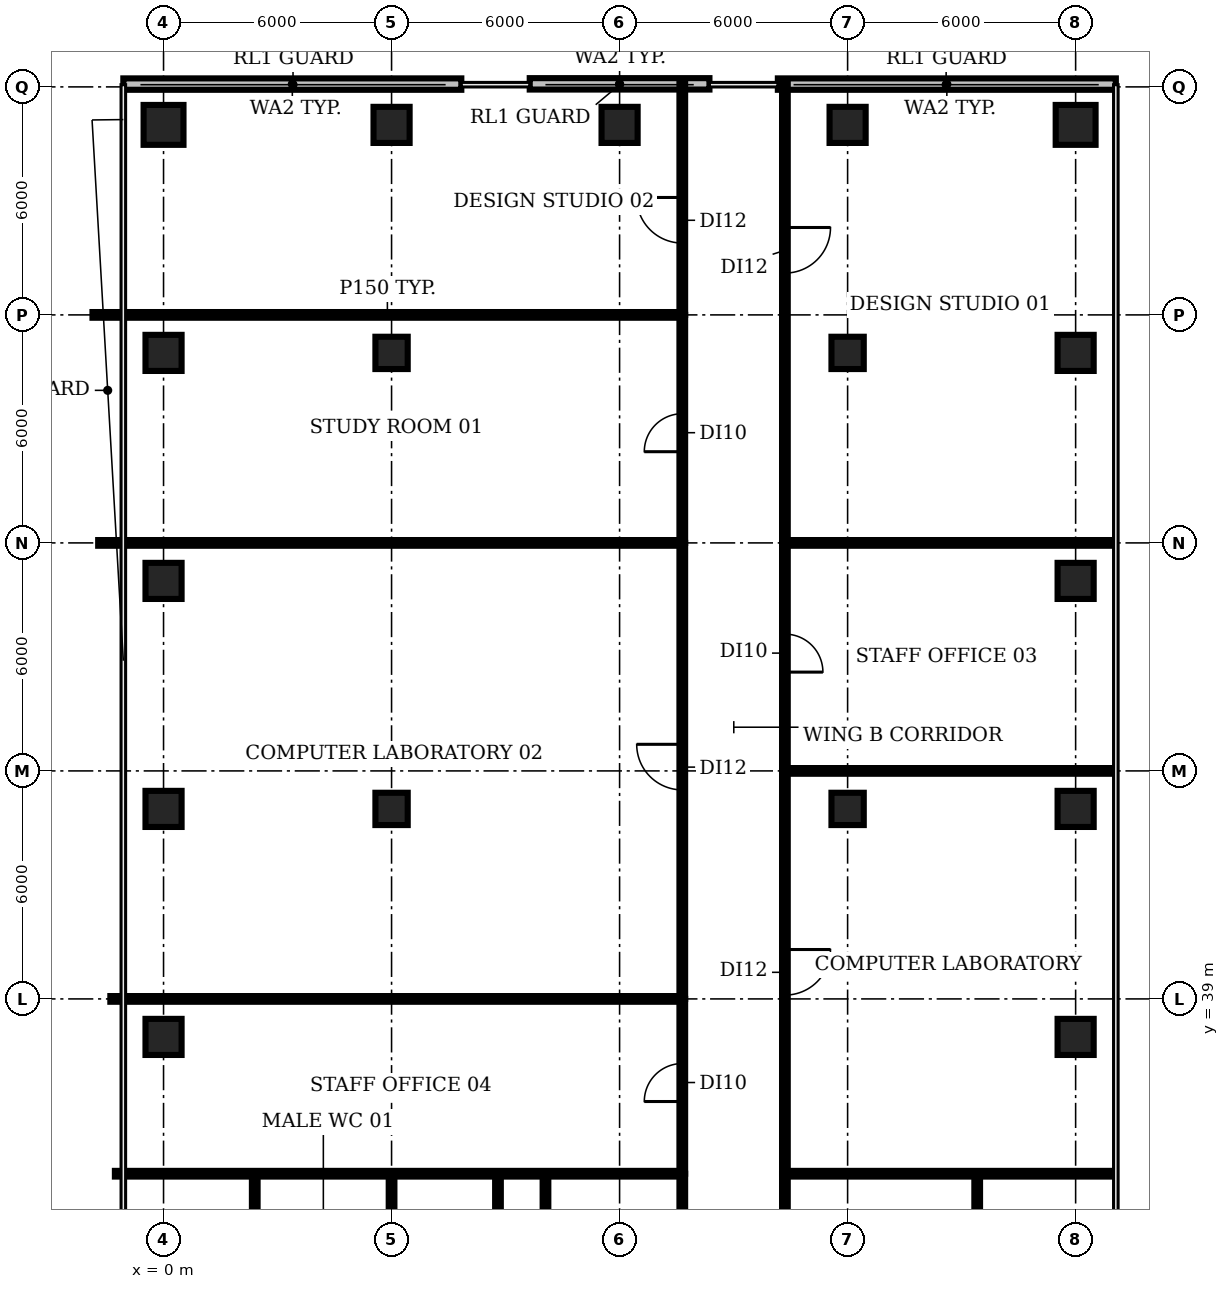
"""IFC4 building model, lengths in metres.
Left out: names, types, materials, properties, quantities, classifications, styles, units other than length and angle.
Written with IfcOpenShell. Run it as: python <this file> out.ifc"""

import sys

from ifc_helpers import new_model, si_unit, direction, frame, frame_2d, origin, origin_2d, place, context, subcontext, project, spatial, rectangle, circle, extrude, element, fill, save


model = new_model("IFC4")
c1 = context("Model", 3, precision=1e-05, world=origin(), true_north=direction((0.0, 1.0)))
c2 = subcontext(c1, "Body", "Model", "MODEL_VIEW")
j1 = project(units=[si_unit("LENGTHUNIT", "METRE"), si_unit("PLANEANGLEUNIT", "RADIAN")], contexts=[c1])
p1 = place(None, origin())
s1 = spatial("IfcSite", under=j1, at=p1, CompositionType="ELEMENT")
p2 = place(p1, origin())
s2 = spatial("IfcBuilding", under=s1, at=p2, CompositionType="ELEMENT")
p3 = place(p2, frame((0.0, 0.0, 58.4)))
s3 = spatial("IfcBuildingStorey", under=s2, at=p3, CompositionType="ELEMENT", Elevation=58.4)
for number, where, z_axis, x_axis in (
    (1, (0.0, 38.0, 0.0), (0.0, 0.0, 1.0), (1.0, 0.0, 0.0)),
    (2, (0.0, 44.0, 0.0), (0.0, 0.0, 1.0), (1.0, 0.0, 0.0)),
    (3, (0.0, 50.0, 0.0), (0.0, 0.0, 1.0), (1.0, 0.0, 0.0)),
    (4, (0.0, 56.0, 0.0), (0.0, 0.0, 1.0), (1.0, 0.0, 0.0)),
):
    element("IfcColumn", number, at=place(p3, frame(where, z_axis=z_axis, x_axis=x_axis)), inside=s3, PredefinedType="COLUMN", context=c2, shape_type="SweptSolid", body=[
        extrude(rectangle(XDim=0.95, YDim=0.95, at=origin_2d()), origin(), (0.0, 0.0, 1.0), 3.85),
    ])
p4 = place(p3, frame((0.0, 62.0, 0.0), z_axis=(0.0, 0.0, 1.0), x_axis=(1.0, 0.0, 0.0)))
e5 = element("IfcColumn", 5, at=p4, inside=s3, PredefinedType="COLUMN", context=c2, shape_type="SweptSolid", body=[
    extrude(circle(Radius=0.525, at=origin_2d()), origin(), (0.0, 0.0, 1.0), 3.85),
])
for number, where, z_axis, x_axis in (
    (6, (6.0, 44.0, 0.0), (0.0, 0.0, 1.0), (1.0, 0.0, 0.0)),
    (7, (6.0, 56.0, 0.0), (0.0, 0.0, 1.0), (1.0, 0.0, 0.0)),
):
    element("IfcColumn", number, at=place(p3, frame(where, z_axis=z_axis, x_axis=x_axis)), inside=s3, PredefinedType="COLUMN", context=c2, shape_type="SweptSolid", body=[
        extrude(rectangle(XDim=0.85, YDim=0.85, at=origin_2d()), origin(), (0.0, 0.0, 1.0), 3.85),
    ])
for number, where, z_axis, x_axis in (
    (8, (6.0, 62.0, 0.0), (0.0, 0.0, 1.0), (1.0, 0.0, 0.0)),
    (9, (12.0, 62.0, 0.0), (0.0, 0.0, 1.0), (1.0, 0.0, 0.0)),
):
    element("IfcColumn", number, at=place(p3, frame(where, z_axis=z_axis, x_axis=x_axis)), inside=s3, PredefinedType="COLUMN", context=c2, shape_type="SweptSolid", body=[
        extrude(rectangle(XDim=0.95, YDim=0.95, at=origin_2d()), origin(), (0.0, 0.0, 1.0), 3.85),
    ])
for number, where, z_axis, x_axis in (
    (10, (18.0, 44.0, 0.0), (0.0, 0.0, 1.0), (1.0, 0.0, 0.0)),
    (11, (18.0, 56.0, 0.0), (0.0, 0.0, 1.0), (1.0, 0.0, 0.0)),
):
    element("IfcColumn", number, at=place(p3, frame(where, z_axis=z_axis, x_axis=x_axis)), inside=s3, PredefinedType="COLUMN", context=c2, shape_type="SweptSolid", body=[
        extrude(rectangle(XDim=0.85, YDim=0.85, at=origin_2d()), origin(), (0.0, 0.0, 1.0), 3.85),
    ])
for number, where, z_axis, x_axis in (
    (12, (18.0, 62.0, 0.0), (0.0, 0.0, 1.0), (1.0, 0.0, 0.0)),
    (13, (24.0, 38.0, 0.0), (0.0, 0.0, 1.0), (1.0, 0.0, 0.0)),
    (14, (24.0, 44.0, 0.0), (0.0, 0.0, 1.0), (1.0, 0.0, 0.0)),
    (15, (24.0, 50.0, 0.0), (0.0, 0.0, 1.0), (1.0, 0.0, 0.0)),
    (16, (24.0, 56.0, 0.0), (0.0, 0.0, 1.0), (1.0, 0.0, 0.0)),
):
    element("IfcColumn", number, at=place(p3, frame(where, z_axis=z_axis, x_axis=x_axis)), inside=s3, PredefinedType="COLUMN", context=c2, shape_type="SweptSolid", body=[
        extrude(rectangle(XDim=0.95, YDim=0.95, at=origin_2d()), origin(), (0.0, 0.0, 1.0), 3.85),
    ])
p5 = place(p3, frame((24.0, 62.0, 0.0), z_axis=(0.0, 0.0, 1.0), x_axis=(1.0, 0.0, 0.0)))
e17 = element("IfcColumn", 17, at=p5, inside=s3, PredefinedType="COLUMN", context=c2, shape_type="SweptSolid", body=[
    extrude(circle(Radius=0.525, at=origin_2d()), origin(), (0.0, 0.0, 1.0), 3.85),
])
p6 = place(p3, frame((25.058, 63.074, 0.0), z_axis=(0.0, 0.0, 1.0), x_axis=(-1.0, 0.0, 0.0)))
e18 = element("IfcWall", 18, at=p6, inside=s3, PredefinedType="SOLIDWALL", context=c2, shape_type="SweptSolid", body=[
    extrude(rectangle(XDim=8.894, YDim=0.3, at=frame_2d((4.447, 0.0))), origin(), (0.0, 0.0, 1.0), 3.85),
])
p7 = place(p3, frame((14.365, 63.08, 0.0), z_axis=(0.0, 0.0, 1.0), x_axis=(-1.0, 0.0, 0.0)))
e19 = element("IfcWall", 19, at=p7, inside=s3, PredefinedType="SOLIDWALL", context=c2, shape_type="SweptSolid", body=[
    extrude(rectangle(XDim=4.729, YDim=0.3, at=frame_2d((2.365, 0.0))), origin(), (0.0, 0.0, 1.0), 3.85),
])
p8 = place(p3, frame((7.835, 63.074, 0.0), z_axis=(0.0, 0.0, 1.0), x_axis=(-1.0, 0.0, 0.0)))
e20 = element("IfcWall", 20, at=p8, inside=s3, PredefinedType="SOLIDWALL", context=c2, shape_type="SweptSolid", body=[
    extrude(rectangle(XDim=8.894, YDim=0.3, at=frame_2d((4.447, 0.0))), origin(), (0.0, 0.0, 1.0), 3.85),
])
p9 = place(p3, frame((-1.87, 57.0, 0.0), z_axis=(0.0, 0.0, 1.0), x_axis=(1.0, 0.0, 0.0)))
e21 = element("IfcWall", 21, at=p9, inside=s3, PredefinedType="PARTITIONING", context=c2, shape_type="SweptSolid", body=[
    extrude(rectangle(XDim=15.52, YDim=0.15, at=frame_2d((7.76, 0.0))), origin(), (0.0, 0.0, 1.0), 2.83),
])
p10 = place(p3, frame((-1.72, 51.0, 0.0), z_axis=(0.0, 0.0, 1.0), x_axis=(1.0, 0.0, 0.0)))
e22 = element("IfcWall", 22, at=p10, inside=s3, PredefinedType="PARTITIONING", context=c2, shape_type="SweptSolid", body=[
    extrude(rectangle(XDim=15.37, YDim=0.15, at=frame_2d((7.685, 0.0))), origin(), (0.0, 0.0, 1.0), 2.83),
])
p11 = place(p3, frame((-1.4, 39.0, 0.0), z_axis=(0.0, 0.0, 1.0), x_axis=(1.0, 0.0, 0.0)))
e23 = element("IfcWall", 23, at=p11, inside=s3, PredefinedType="PARTITIONING", context=c2, shape_type="SweptSolid", body=[
    extrude(rectangle(XDim=15.05, YDim=0.15, at=frame_2d((7.525, 0.0))), origin(), (0.0, 0.0, 1.0), 2.83),
])
p12 = place(p3, frame((-1.28, 34.4, 0.0), z_axis=(0.0, 0.0, 1.0), x_axis=(1.0, 0.0, 0.0)))
e24 = element("IfcWall", 24, at=p12, inside=s3, PredefinedType="PARTITIONING", context=c2, shape_type="SweptSolid", body=[
    extrude(rectangle(XDim=14.93, YDim=0.15, at=frame_2d((7.465, 0.0))), origin(), (0.0, 0.0, 1.0), 2.83),
])
for number, where, z_axis, x_axis in (
    (25, (2.4, 29.6, 0.0), (0.0, 0.0, 1.0), (0.0, 1.0, 0.0)),
    (26, (6.0, 29.6, 0.0), (0.0, 0.0, 1.0), (0.0, 1.0, 0.0)),
    (27, (8.8, 29.6, 0.0), (0.0, 0.0, 1.0), (0.0, 1.0, 0.0)),
    (28, (10.05, 29.6, 0.0), (0.0, 0.0, 1.0), (0.0, 1.0, 0.0)),
):
    element("IfcWall", number, at=place(p3, frame(where, z_axis=z_axis, x_axis=x_axis)), inside=s3, PredefinedType="PARTITIONING", context=c2, shape_type="SweptSolid", body=[
        extrude(rectangle(XDim=4.8, YDim=0.15, at=frame_2d((2.4, 0.0))), origin(), (0.0, 0.0, 1.0), 2.83),
    ])
p13 = place(p3, frame((13.65, 29.6, 0.0), z_axis=(0.0, 0.0, 1.0), x_axis=(0.0, 1.0, 0.0)))
e29 = element("IfcWall", 29, at=p13, inside=s3, PredefinedType="PARTITIONING", context=c2, shape_type="SweptSolid", body=[
    extrude(rectangle(XDim=4.8, YDim=0.15, at=frame_2d((2.4, 0.0))), origin(), (0.0, 0.0, 1.0), 2.83),
])
p14 = place(p13, frame((1.9, 0.0, 0.0)))
e30 = element("IfcOpeningElement", 30, at=p14, cuts=e29, PredefinedType="OPENING", context=c2, shape_type="SweptSolid", body=[
    extrude(rectangle(XDim=0.9, YDim=2.1, at=frame_2d((0.45, 1.05))), frame((0.0, 0.085, 0.0), z_axis=(0.0, -1.0, 0.0), x_axis=(1.0, 0.0, 0.0)), (0.0, 0.0, 1.0), 0.17),
])
p15 = place(p3, frame((13.65, 34.4, 0.0), z_axis=(0.0, 0.0, 1.0), x_axis=(0.0, 1.0, 0.0)))
e31 = element("IfcWall", 31, at=p15, inside=s3, PredefinedType="PARTITIONING", context=c2, shape_type="SweptSolid", body=[
    extrude(rectangle(XDim=4.6, YDim=0.15, at=frame_2d((2.3, 0.0))), origin(), (0.0, 0.0, 1.0), 2.83),
])
p16 = place(p15, frame((1.9, 0.0, 0.0)))
e32 = element("IfcOpeningElement", 32, at=p16, cuts=e31, PredefinedType="OPENING", context=c2, shape_type="SweptSolid", body=[
    extrude(rectangle(XDim=1.0, YDim=2.1, at=frame_2d((0.5, 1.05))), frame((0.0, 0.085, 0.0), z_axis=(0.0, -1.0, 0.0), x_axis=(1.0, 0.0, 0.0)), (0.0, 0.0, 1.0), 0.17),
])
p17 = place(p3, frame((13.65, 39.0, 0.0), z_axis=(0.0, 0.0, 1.0), x_axis=(0.0, 1.0, 0.0)))
e33 = element("IfcWall", 33, at=p17, inside=s3, PredefinedType="PARTITIONING", context=c2, shape_type="SweptSolid", body=[
    extrude(rectangle(XDim=12.0, YDim=0.15, at=frame_2d((6.0, 0.0))), origin(), (0.0, 0.0, 1.0), 2.83),
])
p18 = place(p17, frame((5.5, 0.0, 0.0)))
e34 = element("IfcOpeningElement", 34, at=p18, cuts=e33, PredefinedType="OPENING", context=c2, shape_type="SweptSolid", body=[
    extrude(rectangle(XDim=1.2, YDim=2.1, at=frame_2d((0.6, 1.05))), frame((0.0, 0.085, 0.0), z_axis=(0.0, -1.0, 0.0), x_axis=(1.0, 0.0, 0.0)), (0.0, 0.0, 1.0), 0.17),
])
p19 = place(p3, frame((13.65, 51.0, 0.0), z_axis=(0.0, 0.0, 1.0), x_axis=(0.0, 1.0, 0.0)))
e35 = element("IfcWall", 35, at=p19, inside=s3, PredefinedType="PARTITIONING", context=c2, shape_type="SweptSolid", body=[
    extrude(rectangle(XDim=6.0, YDim=0.15, at=frame_2d((3.0, 0.0))), origin(), (0.0, 0.0, 1.0), 2.83),
])
p20 = place(p19, frame((2.4, 0.0, 0.0)))
e36 = element("IfcOpeningElement", 36, at=p20, cuts=e35, PredefinedType="OPENING", context=c2, shape_type="SweptSolid", body=[
    extrude(rectangle(XDim=1.0, YDim=2.1, at=frame_2d((0.5, 1.05))), frame((0.0, 0.085, 0.0), z_axis=(0.0, -1.0, 0.0), x_axis=(1.0, 0.0, 0.0)), (0.0, 0.0, 1.0), 0.17),
])
p21 = place(p3, frame((13.65, 57.0, 0.0), z_axis=(0.0, 0.0, 1.0), x_axis=(0.0, 1.0, 0.0)))
e37 = element("IfcWall", 37, at=p21, inside=s3, PredefinedType="PARTITIONING", context=c2, shape_type="SweptSolid", body=[
    extrude(rectangle(XDim=6.118, YDim=0.15, at=frame_2d((3.059, 0.0))), origin(), (0.0, 0.0, 1.0), 2.83),
])
p22 = place(p21, frame((1.89, 0.0, 0.0)))
e38 = element("IfcOpeningElement", 38, at=p22, cuts=e37, PredefinedType="OPENING", context=c2, shape_type="SweptSolid", body=[
    extrude(rectangle(XDim=1.2, YDim=2.1, at=frame_2d((0.6, 1.05))), frame((0.0, 0.085, 0.0), z_axis=(0.0, -1.0, 0.0), x_axis=(1.0, 0.0, 0.0)), (0.0, 0.0, 1.0), 0.17),
])
p23 = place(p3, frame((16.35, 29.6, 0.0), z_axis=(0.0, 0.0, 1.0), x_axis=(0.0, 1.0, 0.0)))
e39 = element("IfcWall", 39, at=p23, inside=s3, PredefinedType="PARTITIONING", context=c2, shape_type="SweptSolid", body=[
    extrude(rectangle(XDim=4.8, YDim=0.15, at=frame_2d((2.4, 0.0))), origin(), (0.0, 0.0, 1.0), 2.83),
])
p24 = place(p3, frame((16.35, 34.4, 0.0), z_axis=(0.0, 0.0, 1.0), x_axis=(1.0, 0.0, 0.0)))
e40 = element("IfcWall", 40, at=p24, inside=s3, PredefinedType="PARTITIONING", context=c2, shape_type="SweptSolid", body=[
    extrude(rectangle(XDim=8.66, YDim=0.15, at=frame_2d((4.33, 0.0))), origin(), (0.0, 0.0, 1.0), 2.83),
])
p25 = place(p3, frame((16.35, 45.0, 0.0), z_axis=(0.0, 0.0, 1.0), x_axis=(0.0, -1.0, 0.0)))
e41 = element("IfcWall", 41, at=p25, inside=s3, PredefinedType="PARTITIONING", context=c2, shape_type="SweptSolid", body=[
    extrude(rectangle(XDim=10.6, YDim=0.15, at=frame_2d((5.3, 0.0))), origin(), (0.0, 0.0, 1.0), 2.83),
])
p26 = place(p25, frame((4.7, 0.0, 0.0)))
e42 = element("IfcOpeningElement", 42, at=p26, cuts=e41, PredefinedType="OPENING", context=c2, shape_type="SweptSolid", body=[
    extrude(rectangle(XDim=1.2, YDim=2.1, at=frame_2d((0.6, 1.05))), frame((0.0, 0.085, 0.0), z_axis=(0.0, -1.0, 0.0), x_axis=(1.0, 0.0, 0.0)), (0.0, 0.0, 1.0), 0.17),
])
p27 = place(p3, frame((16.35, 45.0, 0.0), z_axis=(0.0, 0.0, 1.0), x_axis=(1.0, 0.0, 0.0)))
e43 = element("IfcWall", 43, at=p27, inside=s3, PredefinedType="PARTITIONING", context=c2, shape_type="SweptSolid", body=[
    extrude(rectangle(XDim=8.66, YDim=0.15, at=frame_2d((4.33, 0.0))), origin(), (0.0, 0.0, 1.0), 2.83),
])
p28 = place(p3, frame((16.35, 51.0, 0.0), z_axis=(0.0, 0.0, 1.0), x_axis=(0.0, -1.0, 0.0)))
e44 = element("IfcWall", 44, at=p28, inside=s3, PredefinedType="PARTITIONING", context=c2, shape_type="SweptSolid", body=[
    extrude(rectangle(XDim=6.0, YDim=0.15, at=frame_2d((3.0, 0.0))), origin(), (0.0, 0.0, 1.0), 2.83),
])
p29 = place(p28, frame((2.4, 0.0, 0.0)))
e45 = element("IfcOpeningElement", 45, at=p29, cuts=e44, PredefinedType="OPENING", context=c2, shape_type="SweptSolid", body=[
    extrude(rectangle(XDim=1.0, YDim=2.1, at=frame_2d((0.5, 1.05))), frame((0.0, 0.085, 0.0), z_axis=(0.0, -1.0, 0.0), x_axis=(1.0, 0.0, 0.0)), (0.0, 0.0, 1.0), 0.17),
])
p30 = place(p3, frame((16.35, 51.0, 0.0), z_axis=(0.0, 0.0, 1.0), x_axis=(1.0, 0.0, 0.0)))
e46 = element("IfcWall", 46, at=p30, inside=s3, PredefinedType="PARTITIONING", context=c2, shape_type="SweptSolid", body=[
    extrude(rectangle(XDim=8.66, YDim=0.15, at=frame_2d((4.33, 0.0))), origin(), (0.0, 0.0, 1.0), 2.83),
])
p31 = place(p3, frame((16.35, 63.118, 0.0), z_axis=(0.0, 0.0, 1.0), x_axis=(0.0, -1.0, 0.0)))
e47 = element("IfcWall", 47, at=p31, inside=s3, PredefinedType="PARTITIONING", context=c2, shape_type="SweptSolid", body=[
    extrude(rectangle(XDim=12.118, YDim=0.15, at=frame_2d((6.059, 0.0))), origin(), (0.0, 0.0, 1.0), 2.83),
])
p32 = place(p31, frame((3.818, 0.0, 0.0)))
e48 = element("IfcOpeningElement", 48, at=p32, cuts=e47, PredefinedType="OPENING", context=c2, shape_type="SweptSolid", body=[
    extrude(rectangle(XDim=1.2, YDim=2.1, at=frame_2d((0.6, 1.05))), frame((0.0, 0.085, 0.0), z_axis=(0.0, -1.0, 0.0), x_axis=(1.0, 0.0, 0.0)), (0.0, 0.0, 1.0), 0.17),
])
p33 = place(p3, frame((21.41, 29.6, 0.0), z_axis=(0.0, 0.0, 1.0), x_axis=(0.0, 1.0, 0.0)))
e49 = element("IfcWall", 49, at=p33, inside=s3, PredefinedType="PARTITIONING", context=c2, shape_type="SweptSolid", body=[
    extrude(rectangle(XDim=4.8, YDim=0.15, at=frame_2d((2.4, 0.0))), origin(), (0.0, 0.0, 1.0), 2.83),
])
p34 = place(p16, origin())
e50 = element("IfcDoor", 50, at=p34, inside=s3, OperationType="SINGLE_SWING_LEFT", PredefinedType="DOOR", context=c2, shape_type="SweptSolid", body=[
    extrude(rectangle(XDim=1.0, YDim=2.1, at=frame_2d((0.5, 1.05))), frame((0.0, 0.025, 0.0), z_axis=(0.0, -1.0, 0.0), x_axis=(1.0, 0.0, 0.0)), (0.0, 0.0, 1.0), 0.05),
])
fill(e32, e50)
p35 = place(p18, origin())
e51 = element("IfcDoor", 51, at=p35, inside=s3, OperationType="SINGLE_SWING_RIGHT", PredefinedType="DOOR", context=c2, shape_type="SweptSolid", body=[
    extrude(rectangle(XDim=1.2, YDim=2.1, at=frame_2d((0.6, 1.05))), frame((0.0, 0.025, 0.0), z_axis=(0.0, -1.0, 0.0), x_axis=(1.0, 0.0, 0.0)), (0.0, 0.0, 1.0), 0.05),
])
fill(e34, e51)
p36 = place(p20, origin())
e52 = element("IfcDoor", 52, at=p36, inside=s3, OperationType="SINGLE_SWING_LEFT", PredefinedType="DOOR", context=c2, shape_type="SweptSolid", body=[
    extrude(rectangle(XDim=1.0, YDim=2.1, at=frame_2d((0.5, 1.05))), frame((0.0, 0.025, 0.0), z_axis=(0.0, -1.0, 0.0), x_axis=(1.0, 0.0, 0.0)), (0.0, 0.0, 1.0), 0.05),
])
fill(e36, e52)
p37 = place(p22, origin())
e53 = element("IfcDoor", 53, at=p37, inside=s3, OperationType="SINGLE_SWING_RIGHT", PredefinedType="DOOR", context=c2, shape_type="SweptSolid", body=[
    extrude(rectangle(XDim=1.2, YDim=2.1, at=frame_2d((0.6, 1.05))), frame((0.0, 0.025, 0.0), z_axis=(0.0, -1.0, 0.0), x_axis=(1.0, 0.0, 0.0)), (0.0, 0.0, 1.0), 0.05),
])
fill(e38, e53)
p38 = place(p26, origin())
e54 = element("IfcDoor", 54, at=p38, inside=s3, OperationType="SINGLE_SWING_LEFT", PredefinedType="DOOR", context=c2, shape_type="SweptSolid", body=[
    extrude(rectangle(XDim=1.2, YDim=2.1, at=frame_2d((0.6, 1.05))), frame((0.0, 0.025, 0.0), z_axis=(0.0, -1.0, 0.0), x_axis=(1.0, 0.0, 0.0)), (0.0, 0.0, 1.0), 0.05),
])
fill(e42, e54)
p39 = place(p29, origin())
e55 = element("IfcDoor", 55, at=p39, inside=s3, OperationType="SINGLE_SWING_RIGHT", PredefinedType="DOOR", context=c2, shape_type="SweptSolid", body=[
    extrude(rectangle(XDim=1.0, YDim=2.1, at=frame_2d((0.5, 1.05))), frame((0.0, 0.025, 0.0), z_axis=(0.0, -1.0, 0.0), x_axis=(1.0, 0.0, 0.0)), (0.0, 0.0, 1.0), 0.05),
])
fill(e45, e55)
p40 = place(p32, origin())
e56 = element("IfcDoor", 56, at=p40, inside=s3, OperationType="SINGLE_SWING_LEFT", PredefinedType="DOOR", context=c2, shape_type="SweptSolid", body=[
    extrude(rectangle(XDim=1.2, YDim=2.1, at=frame_2d((0.6, 1.05))), frame((0.0, 0.025, 0.0), z_axis=(0.0, -1.0, 0.0), x_axis=(1.0, 0.0, 0.0)), (0.0, 0.0, 1.0), 0.05),
])
fill(e48, e56)
save(model, sys.argv[1])
